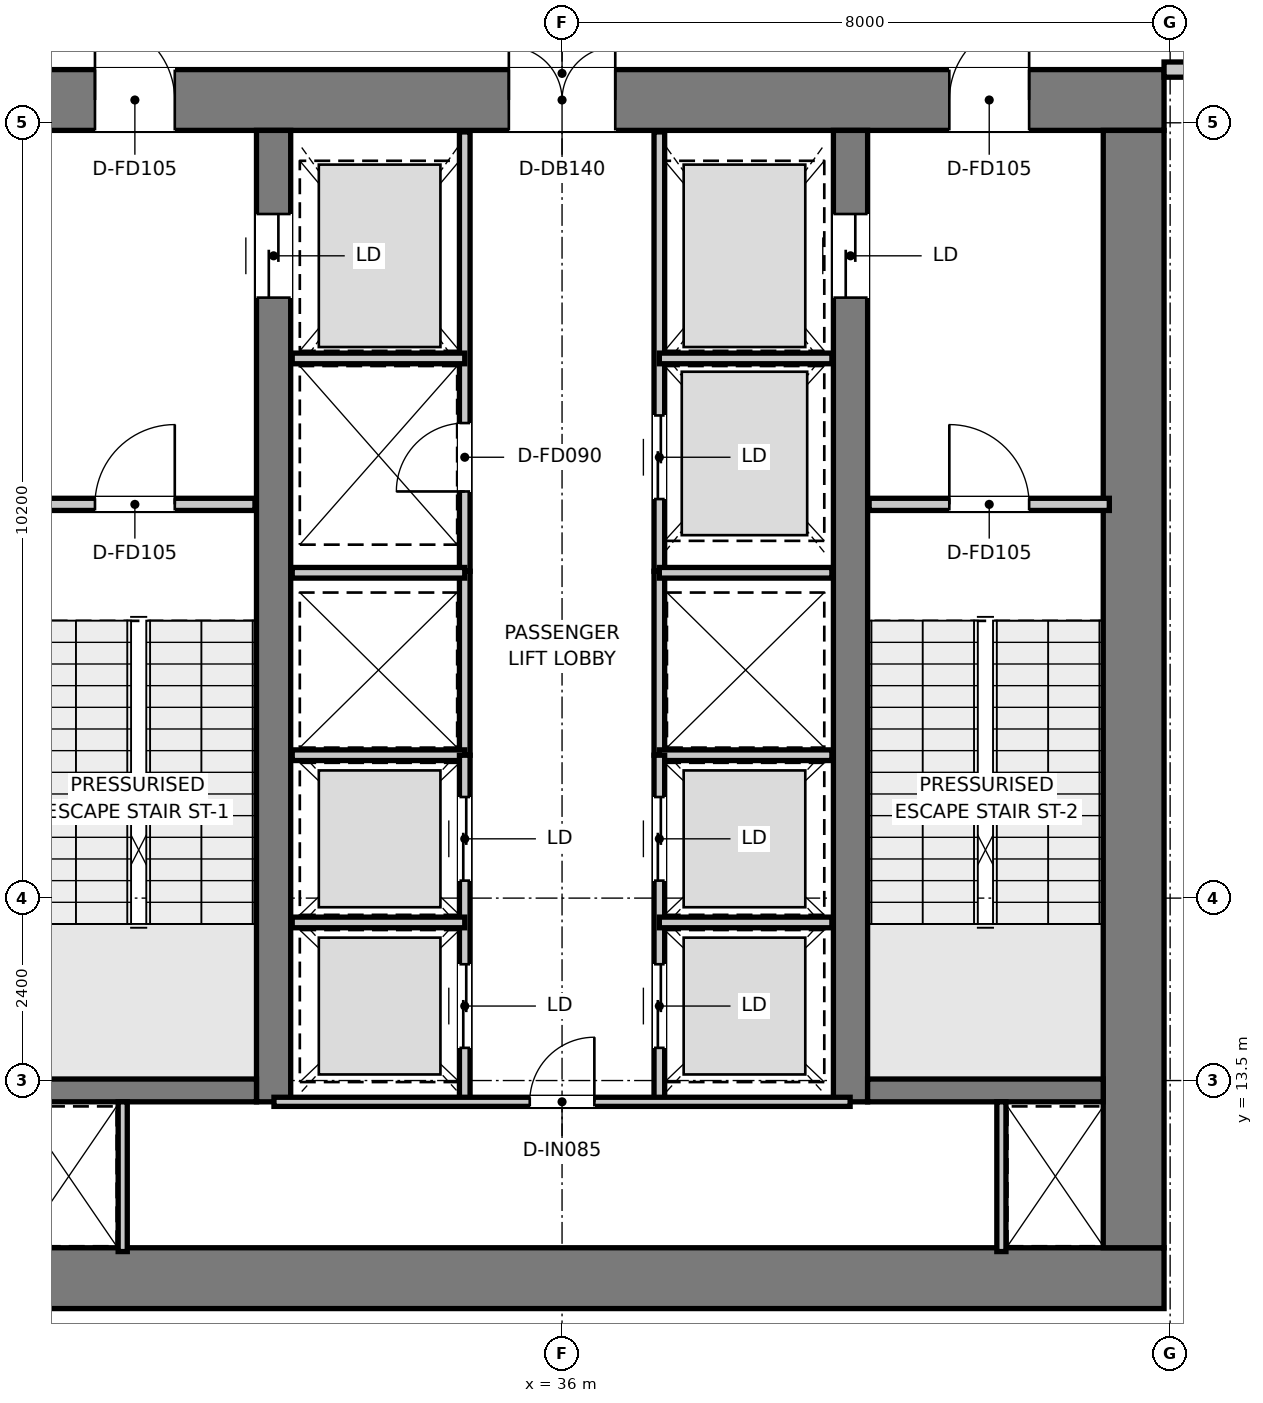
"""IFC4 building model, lengths in metres.
Left out: names, types, materials, properties, quantities, classifications, styles, units other than length and angle.
Written with IfcOpenShell. Run it as: python <this file> out.ifc"""

import sys

from ifc_helpers import new_model, si_unit, direction, frame, frame_2d, origin, place, context, subcontext, project, spatial, rectangle, extrude, element, fill, save


model = new_model("IFC4")
c1 = context("Model", 3, precision=1e-05, world=origin(), true_north=direction((0.0, 1.0)))
c2 = subcontext(c1, "Body", "Model", "MODEL_VIEW")
j1 = project(units=[si_unit("LENGTHUNIT", "METRE"), si_unit("PLANEANGLEUNIT", "RADIAN")], contexts=[c1])
p1 = place(None, origin())
s1 = spatial("IfcSite", under=j1, at=p1, CompositionType="ELEMENT")
p2 = place(p1, origin())
s2 = spatial("IfcBuilding", under=s1, at=p2, CompositionType="ELEMENT")
p3 = place(p2, frame((0.0, 0.0, 20.0)))
s3 = spatial("IfcBuildingStorey", under=s2, at=p3, CompositionType="ELEMENT", Elevation=20.0)
p4 = place(p3, frame((28.08, 10.9, 0.0), z_axis=(0.0, 0.0, 1.0), x_axis=(1.0, 0.0, 0.0)))
e1 = element("IfcWall", 1, at=p4, inside=s3, PredefinedType="SHEAR", context=c2, shape_type="SweptSolid", body=[
    extrude(rectangle(XDim=15.84, YDim=0.8, at=frame_2d((7.92, 0.0))), origin(), (0.0, 0.0, 1.0), 5.0),
])
p5 = place(p3, frame((28.08, 26.4, 0.0), z_axis=(0.0, 0.0, 1.0), x_axis=(1.0, 0.0, 0.0)))
e2 = element("IfcWall", 2, at=p5, inside=s3, PredefinedType="SHEAR", context=c2, shape_type="SweptSolid", body=[
    extrude(rectangle(XDim=15.84, YDim=0.8, at=frame_2d((7.92, 0.0))), origin(), (0.0, 0.0, 1.0), 5.0),
])
p6 = place(p5, frame((7.22, 0.0, 0.0)))
e3 = element("IfcOpeningElement", 3, at=p6, cuts=e2, PredefinedType="OPENING", context=c2, shape_type="SweptSolid", body=[
    extrude(rectangle(XDim=1.4, YDim=2.2, at=frame_2d((0.7, 1.1))), frame((0.0, 0.41, 0.0), z_axis=(0.0, -1.0, 0.0), x_axis=(1.0, 0.0, 0.0)), (0.0, 0.0, 1.0), 0.82),
])
p7 = place(p5, frame((1.775, 0.0, 0.0)))
e4 = element("IfcOpeningElement", 4, at=p7, cuts=e2, PredefinedType="OPENING", context=c2, shape_type="SweptSolid", body=[
    extrude(rectangle(XDim=1.05, YDim=2.1, at=frame_2d((0.525, 1.05))), frame((0.0, 0.41, 0.0), z_axis=(0.0, -1.0, 0.0), x_axis=(1.0, 0.0, 0.0)), (0.0, 0.0, 1.0), 0.82),
])
p8 = place(p5, frame((13.015, 0.0, 0.0)))
e5 = element("IfcOpeningElement", 5, at=p8, cuts=e2, PredefinedType="OPENING", context=c2, shape_type="SweptSolid", body=[
    extrude(rectangle(XDim=1.05, YDim=2.1, at=frame_2d((0.525, 1.05))), frame((0.0, 0.41, 0.0), z_axis=(0.0, -1.0, 0.0), x_axis=(1.0, 0.0, 0.0)), (0.0, 0.0, 1.0), 0.82),
])
p9 = place(p3, frame((43.52, 11.3, 0.0), z_axis=(0.0, 0.0, 1.0), x_axis=(0.0, 1.0, 0.0)))
e6 = element("IfcWall", 6, at=p9, inside=s3, PredefinedType="SHEAR", context=c2, shape_type="SweptSolid", body=[
    extrude(rectangle(XDim=14.7, YDim=0.8, at=frame_2d((7.35, 0.0))), origin(), (0.0, 0.0, 1.0), 5.0),
])
p10 = place(p3, frame((32.205, 13.22, 0.0), z_axis=(0.0, 0.0, 1.0), x_axis=(0.0, 1.0, 0.0)))
e7 = element("IfcWall", 7, at=p10, inside=s3, PredefinedType="SHEAR", context=c2, shape_type="SweptSolid", body=[
    extrude(rectangle(XDim=12.78, YDim=0.45, at=frame_2d((6.39, 0.0))), origin(), (0.0, 0.0, 1.0), 5.0),
])
p11 = place(p10, frame((10.58, 0.0, 0.0)))
e8 = element("IfcOpeningElement", 8, at=p11, cuts=e7, PredefinedType="OPENING", context=c2, shape_type="SweptSolid", body=[
    extrude(rectangle(XDim=1.1, YDim=2.15, at=frame_2d((0.55, 1.075))), frame((0.0, 0.235, 0.0), z_axis=(0.0, -1.0, 0.0), x_axis=(1.0, 0.0, 0.0)), (0.0, 0.0, 1.0), 0.47),
])
p12 = place(p3, frame((39.795, 13.22, 0.0), z_axis=(0.0, 0.0, 1.0), x_axis=(0.0, 1.0, 0.0)))
e9 = element("IfcWall", 9, at=p12, inside=s3, PredefinedType="SHEAR", context=c2, shape_type="SweptSolid", body=[
    extrude(rectangle(XDim=12.78, YDim=0.45, at=frame_2d((6.39, 0.0))), origin(), (0.0, 0.0, 1.0), 5.0),
])
p13 = place(p12, frame((10.58, 0.0, 0.0)))
e10 = element("IfcOpeningElement", 10, at=p13, cuts=e9, PredefinedType="OPENING", context=c2, shape_type="SweptSolid", body=[
    extrude(rectangle(XDim=1.1, YDim=2.15, at=frame_2d((0.55, 1.075))), frame((0.0, 0.235, 0.0), z_axis=(0.0, -1.0, 0.0), x_axis=(1.0, 0.0, 0.0)), (0.0, 0.0, 1.0), 0.47),
])
for number, where, z_axis, x_axis in (
    (11, (28.88, 13.37, 0.0), (0.0, 0.0, 1.0), (1.0, 0.0, 0.0)),
    (12, (40.02, 13.37, 0.0), (0.0, 0.0, 1.0), (1.0, 0.0, 0.0)),
):
    element("IfcWall", number, at=place(p3, frame(where, z_axis=z_axis, x_axis=x_axis)), inside=s3, PredefinedType="SHEAR", context=c2, shape_type="SweptSolid", body=[
        extrude(rectangle(XDim=3.1, YDim=0.3, at=frame_2d((1.55, 0.0))), origin(), (0.0, 0.0, 1.0), 5.0),
    ])
p14 = place(p3, frame((28.8, 21.08, 0.0), z_axis=(0.0, 0.0, 1.0), x_axis=(1.0, 0.0, 0.0)))
e13 = element("IfcWall", 13, at=p14, inside=s3, PredefinedType="PARTITIONING", context=c2, shape_type="SweptSolid", body=[
    extrude(rectangle(XDim=3.16, YDim=0.16, at=frame_2d((1.58, 0.0))), origin(), (0.0, 0.0, 1.0), 4.72),
])
p15 = place(p14, frame((1.055, 0.0, 0.0)))
e14 = element("IfcOpeningElement", 14, at=p15, cuts=e13, PredefinedType="OPENING", context=c2, shape_type="SweptSolid", body=[
    extrude(rectangle(XDim=1.05, YDim=2.1, at=frame_2d((0.525, 1.05))), frame((0.0, 0.09, 0.0), z_axis=(0.0, -1.0, 0.0), x_axis=(1.0, 0.0, 0.0)), (0.0, 0.0, 1.0), 0.18),
])
p16 = place(p3, frame((40.04, 21.08, 0.0), z_axis=(0.0, 0.0, 1.0), x_axis=(1.0, 0.0, 0.0)))
e15 = element("IfcWall", 15, at=p16, inside=s3, PredefinedType="PARTITIONING", context=c2, shape_type="SweptSolid", body=[
    extrude(rectangle(XDim=3.16, YDim=0.16, at=frame_2d((1.58, 0.0))), origin(), (0.0, 0.0, 1.0), 4.72),
])
p17 = place(p16, frame((1.055, 0.0, 0.0)))
e16 = element("IfcOpeningElement", 16, at=p17, cuts=e15, PredefinedType="OPENING", context=c2, shape_type="SweptSolid", body=[
    extrude(rectangle(XDim=1.05, YDim=2.1, at=frame_2d((0.525, 1.05))), frame((0.0, 0.09, 0.0), z_axis=(0.0, -1.0, 0.0), x_axis=(1.0, 0.0, 0.0)), (0.0, 0.0, 1.0), 0.18),
])
p18 = place(p3, frame((34.72, 20.2, 0.0), z_axis=(0.0, 0.0, 1.0), x_axis=(0.0, 1.0, 0.0)))
e17 = element("IfcWall", 17, at=p18, inside=s3, PredefinedType="PARTITIONING", context=c2, shape_type="SweptSolid", body=[
    extrude(rectangle(XDim=5.78, YDim=0.14, at=frame_2d((2.89, 0.0))), origin(), (0.0, 0.0, 1.0), 3.52),
])
p19 = place(p18, frame((1.05, 0.0, 0.0)))
e18 = element("IfcOpeningElement", 18, at=p19, cuts=e17, PredefinedType="OPENING", context=c2, shape_type="SweptSolid", body=[
    extrude(rectangle(XDim=0.9, YDim=2.1, at=frame_2d((0.45, 1.05))), frame((0.0, 0.08, 0.0), z_axis=(0.0, -1.0, 0.0), x_axis=(1.0, 0.0, 0.0)), (0.0, 0.0, 1.0), 0.16),
])
p20 = place(p3, frame((37.28, 20.2, 0.0), z_axis=(0.0, 0.0, 1.0), x_axis=(0.0, 1.0, 0.0)))
e19 = element("IfcWall", 19, at=p20, inside=s3, PredefinedType="PARTITIONING", context=c2, shape_type="SweptSolid", body=[
    extrude(rectangle(XDim=5.78, YDim=0.14, at=frame_2d((2.89, 0.0))), origin(), (0.0, 0.0, 1.0), 3.52),
])
p21 = place(p20, frame((0.95, 0.0, 0.0)))
e20 = element("IfcOpeningElement", 20, at=p21, cuts=e19, PredefinedType="OPENING", context=c2, shape_type="SweptSolid", body=[
    extrude(rectangle(XDim=1.1, YDim=2.15, at=frame_2d((0.55, 1.075))), frame((0.0, 0.08, 0.0), z_axis=(0.0, -1.0, 0.0), x_axis=(1.0, 0.0, 0.0)), (0.0, 0.0, 1.0), 0.16),
])
for number, where, z_axis, x_axis in (
    (21, (32.45, 23.0, 0.0), (0.0, 0.0, 1.0), (1.0, 0.0, 0.0)),
    (22, (37.28, 23.0, 0.0), (0.0, 0.0, 1.0), (1.0, 0.0, 0.0)),
):
    element("IfcWall", number, at=place(p3, frame(where, z_axis=z_axis, x_axis=x_axis)), inside=s3, PredefinedType="PARTITIONING", context=c2, shape_type="SweptSolid", body=[
        extrude(rectangle(XDim=2.27, YDim=0.14, at=frame_2d((1.135, 0.0))), origin(), (0.0, 0.0, 1.0), 3.52),
    ])
for number, where, z_axis, x_axis in (
    (23, (34.72, 17.78, 0.0), (0.0, 0.0, 1.0), (0.0, 1.0, 0.0)),
    (24, (37.28, 17.78, 0.0), (0.0, 0.0, 1.0), (0.0, 1.0, 0.0)),
):
    element("IfcWall", number, at=place(p3, frame(where, z_axis=z_axis, x_axis=x_axis)), inside=s3, PredefinedType="PARTITIONING", context=c2, shape_type="SweptSolid", body=[
        extrude(rectangle(XDim=2.42, YDim=0.14, at=frame_2d((1.21, 0.0))), origin(), (0.0, 0.0, 1.0), 4.72),
    ])
for number, where, z_axis, x_axis in (
    (25, (32.45, 17.78, 0.0), (0.0, 0.0, 1.0), (1.0, 0.0, 0.0)),
    (26, (32.45, 20.18, 0.0), (0.0, 0.0, 1.0), (1.0, 0.0, 0.0)),
    (27, (37.28, 17.78, 0.0), (0.0, 0.0, 1.0), (1.0, 0.0, 0.0)),
    (28, (37.28, 20.18, 0.0), (0.0, 0.0, 1.0), (1.0, 0.0, 0.0)),
):
    element("IfcWall", number, at=place(p3, frame(where, z_axis=z_axis, x_axis=x_axis)), inside=s3, PredefinedType="PARTITIONING", context=c2, shape_type="SweptSolid", body=[
        extrude(rectangle(XDim=2.27, YDim=0.14, at=frame_2d((1.135, 0.0))), origin(), (0.0, 0.0, 1.0), 4.72),
    ])
p22 = place(p3, frame((34.72, 13.22, 0.0), z_axis=(0.0, 0.0, 1.0), x_axis=(0.0, 1.0, 0.0)))
e29 = element("IfcWall", 29, at=p22, inside=s3, PredefinedType="PARTITIONING", context=c2, shape_type="SweptSolid", body=[
    extrude(rectangle(XDim=4.56, YDim=0.14, at=frame_2d((2.28, 0.0))), origin(), (0.0, 0.0, 1.0), 4.72),
])
p23 = place(p22, frame((0.71, 0.0, 0.0)))
e30 = element("IfcOpeningElement", 30, at=p23, cuts=e29, PredefinedType="OPENING", context=c2, shape_type="SweptSolid", body=[
    extrude(rectangle(XDim=1.1, YDim=2.15, at=frame_2d((0.55, 1.075))), frame((0.0, 0.08, 0.0), z_axis=(0.0, -1.0, 0.0), x_axis=(1.0, 0.0, 0.0)), (0.0, 0.0, 1.0), 0.16),
])
p24 = place(p22, frame((2.91, 0.0, 0.0)))
e31 = element("IfcOpeningElement", 31, at=p24, cuts=e29, PredefinedType="OPENING", context=c2, shape_type="SweptSolid", body=[
    extrude(rectangle(XDim=1.1, YDim=2.15, at=frame_2d((0.55, 1.075))), frame((0.0, 0.08, 0.0), z_axis=(0.0, -1.0, 0.0), x_axis=(1.0, 0.0, 0.0)), (0.0, 0.0, 1.0), 0.16),
])
p25 = place(p3, frame((32.45, 15.58, 0.0), z_axis=(0.0, 0.0, 1.0), x_axis=(1.0, 0.0, 0.0)))
e32 = element("IfcWall", 32, at=p25, inside=s3, PredefinedType="PARTITIONING", context=c2, shape_type="SweptSolid", body=[
    extrude(rectangle(XDim=2.27, YDim=0.14, at=frame_2d((1.135, 0.0))), origin(), (0.0, 0.0, 1.0), 4.72),
])
p26 = place(p3, frame((37.28, 13.22, 0.0), z_axis=(0.0, 0.0, 1.0), x_axis=(0.0, 1.0, 0.0)))
e33 = element("IfcWall", 33, at=p26, inside=s3, PredefinedType="PARTITIONING", context=c2, shape_type="SweptSolid", body=[
    extrude(rectangle(XDim=4.56, YDim=0.14, at=frame_2d((2.28, 0.0))), origin(), (0.0, 0.0, 1.0), 4.72),
])
p27 = place(p26, frame((0.71, 0.0, 0.0)))
e34 = element("IfcOpeningElement", 34, at=p27, cuts=e33, PredefinedType="OPENING", context=c2, shape_type="SweptSolid", body=[
    extrude(rectangle(XDim=1.1, YDim=2.15, at=frame_2d((0.55, 1.075))), frame((0.0, 0.08, 0.0), z_axis=(0.0, -1.0, 0.0), x_axis=(1.0, 0.0, 0.0)), (0.0, 0.0, 1.0), 0.16),
])
p28 = place(p26, frame((2.91, 0.0, 0.0)))
e35 = element("IfcOpeningElement", 35, at=p28, cuts=e33, PredefinedType="OPENING", context=c2, shape_type="SweptSolid", body=[
    extrude(rectangle(XDim=1.1, YDim=2.15, at=frame_2d((0.55, 1.075))), frame((0.0, 0.08, 0.0), z_axis=(0.0, -1.0, 0.0), x_axis=(1.0, 0.0, 0.0)), (0.0, 0.0, 1.0), 0.16),
])
p29 = place(p3, frame((37.28, 15.58, 0.0), z_axis=(0.0, 0.0, 1.0), x_axis=(1.0, 0.0, 0.0)))
e36 = element("IfcWall", 36, at=p29, inside=s3, PredefinedType="PARTITIONING", context=c2, shape_type="SweptSolid", body=[
    extrude(rectangle(XDim=2.27, YDim=0.14, at=frame_2d((1.135, 0.0))), origin(), (0.0, 0.0, 1.0), 4.72),
])
for number, where, z_axis, x_axis in (
    (37, (30.22, 11.25, 0.0), (0.0, 0.0, 1.0), (0.0, 1.0, 0.0)),
    (38, (41.78, 11.25, 0.0), (0.0, 0.0, 1.0), (0.0, 1.0, 0.0)),
):
    element("IfcWall", number, at=place(p3, frame(where, z_axis=z_axis, x_axis=x_axis)), inside=s3, PredefinedType="PARTITIONING", context=c2, shape_type="SweptSolid", body=[
        extrude(rectangle(XDim=1.97, YDim=0.12, at=frame_2d((0.985, 0.0))), origin(), (0.0, 0.0, 1.0), 4.72),
    ])
p30 = place(p3, frame((32.21, 13.22, 0.0), z_axis=(0.0, 0.0, 1.0), x_axis=(1.0, 0.0, 0.0)))
e39 = element("IfcWall", 39, at=p30, inside=s3, PredefinedType="PARTITIONING", context=c2, shape_type="SweptSolid", body=[
    extrude(rectangle(XDim=7.58, YDim=0.12, at=frame_2d((3.79, 0.0))), origin(), (0.0, 0.0, 1.0), 4.72),
])
p31 = place(p30, frame((3.365, 0.0, 0.0)))
e40 = element("IfcOpeningElement", 40, at=p31, cuts=e39, PredefinedType="OPENING", context=c2, shape_type="SweptSolid", body=[
    extrude(rectangle(XDim=0.85, YDim=2.1, at=frame_2d((0.425, 1.05))), frame((0.0, 0.07, 0.0), z_axis=(0.0, -1.0, 0.0), x_axis=(1.0, 0.0, 0.0)), (0.0, 0.0, 1.0), 0.14),
])
p32 = place(p3, frame((43.92, 26.8, 0.0), z_axis=(0.0, 0.0, 1.0), x_axis=(1.0, 0.0, 0.0)))
e41 = element("IfcWall", 41, at=p32, inside=s3, PredefinedType="PARTITIONING", context=c2, shape_type="SweptSolid", body=[
    extrude(rectangle(XDim=10.16, YDim=0.2, at=frame_2d((5.08, 0.0))), origin(), (0.0, 0.0, 1.0), 3.92),
])
p33 = place(p32, frame((4.98, 0.0, 0.0)))
e42 = element("IfcOpeningElement", 42, at=p33, cuts=e41, PredefinedType="OPENING", context=c2, shape_type="SweptSolid", body=[
    extrude(rectangle(XDim=1.2, YDim=2.15, at=frame_2d((0.6, 1.075))), frame((0.0, 0.11, 0.0), z_axis=(0.0, -1.0, 0.0), x_axis=(1.0, 0.0, 0.0)), (0.0, 0.0, 1.0), 0.22),
])
p34 = place(p15, origin())
e43 = element("IfcDoor", 43, at=p34, inside=s3, OperationType="SINGLE_SWING_RIGHT", PredefinedType="DOOR", context=c2, shape_type="SweptSolid", body=[
    extrude(rectangle(XDim=1.05, YDim=2.1, at=frame_2d((0.525, 1.05))), frame((0.0, 0.025, 0.0), z_axis=(0.0, -1.0, 0.0), x_axis=(1.0, 0.0, 0.0)), (0.0, 0.0, 1.0), 0.05),
])
fill(e14, e43)
p35 = place(p17, origin())
e44 = element("IfcDoor", 44, at=p35, inside=s3, OperationType="SINGLE_SWING_LEFT", PredefinedType="DOOR", context=c2, shape_type="SweptSolid", body=[
    extrude(rectangle(XDim=1.05, YDim=2.1, at=frame_2d((0.525, 1.05))), frame((0.0, 0.025, 0.0), z_axis=(0.0, -1.0, 0.0), x_axis=(1.0, 0.0, 0.0)), (0.0, 0.0, 1.0), 0.05),
])
fill(e16, e44)
p36 = place(p6, origin())
e45 = element("IfcDoor", 45, at=p36, inside=s3, OperationType="DOUBLE_DOOR_SINGLE_SWING", PredefinedType="DOOR", context=c2, shape_type="SweptSolid", body=[
    extrude(rectangle(XDim=1.4, YDim=2.2, at=frame_2d((0.7, 1.1))), frame((0.0, 0.025, 0.0), z_axis=(0.0, -1.0, 0.0), x_axis=(1.0, 0.0, 0.0)), (0.0, 0.0, 1.0), 0.05),
])
fill(e3, e45)
p37 = place(p7, origin())
e46 = element("IfcDoor", 46, at=p37, inside=s3, OperationType="SINGLE_SWING_LEFT", PredefinedType="DOOR", context=c2, shape_type="SweptSolid", body=[
    extrude(rectangle(XDim=1.05, YDim=2.1, at=frame_2d((0.525, 1.05))), frame((0.0, 0.025, 0.0), z_axis=(0.0, -1.0, 0.0), x_axis=(1.0, 0.0, 0.0)), (0.0, 0.0, 1.0), 0.05),
])
fill(e4, e46)
p38 = place(p8, origin())
e47 = element("IfcDoor", 47, at=p38, inside=s3, OperationType="SINGLE_SWING_RIGHT", PredefinedType="DOOR", context=c2, shape_type="SweptSolid", body=[
    extrude(rectangle(XDim=1.05, YDim=2.1, at=frame_2d((0.525, 1.05))), frame((0.0, 0.025, 0.0), z_axis=(0.0, -1.0, 0.0), x_axis=(1.0, 0.0, 0.0)), (0.0, 0.0, 1.0), 0.05),
])
fill(e5, e47)
p39 = place(p11, origin())
e48 = element("IfcDoor", 48, at=p39, inside=s3, OperationType="DOUBLE_DOOR_SLIDING", PredefinedType="DOOR", context=c2, shape_type="SweptSolid", body=[
    extrude(rectangle(XDim=1.1, YDim=2.15, at=frame_2d((0.55, 1.075))), frame((0.0, 0.025, 0.0), z_axis=(0.0, -1.0, 0.0), x_axis=(1.0, 0.0, 0.0)), (0.0, 0.0, 1.0), 0.05),
])
fill(e8, e48)
p40 = place(p13, origin())
e49 = element("IfcDoor", 49, at=p40, inside=s3, OperationType="DOUBLE_DOOR_SLIDING", PredefinedType="DOOR", context=c2, shape_type="SweptSolid", body=[
    extrude(rectangle(XDim=1.1, YDim=2.15, at=frame_2d((0.55, 1.075))), frame((0.0, 0.025, 0.0), z_axis=(0.0, -1.0, 0.0), x_axis=(1.0, 0.0, 0.0)), (0.0, 0.0, 1.0), 0.05),
])
fill(e10, e49)
p41 = place(p19, origin())
e50 = element("IfcDoor", 50, at=p41, inside=s3, OperationType="SINGLE_SWING_LEFT", PredefinedType="DOOR", context=c2, shape_type="SweptSolid", body=[
    extrude(rectangle(XDim=0.9, YDim=2.1, at=frame_2d((0.45, 1.05))), frame((0.0, 0.025, 0.0), z_axis=(0.0, -1.0, 0.0), x_axis=(1.0, 0.0, 0.0)), (0.0, 0.0, 1.0), 0.05),
])
fill(e18, e50)
p42 = place(p21, origin())
e51 = element("IfcDoor", 51, at=p42, inside=s3, OperationType="DOUBLE_DOOR_SLIDING", PredefinedType="DOOR", context=c2, shape_type="SweptSolid", body=[
    extrude(rectangle(XDim=1.1, YDim=2.15, at=frame_2d((0.55, 1.075))), frame((0.0, 0.025, 0.0), z_axis=(0.0, -1.0, 0.0), x_axis=(1.0, 0.0, 0.0)), (0.0, 0.0, 1.0), 0.05),
])
fill(e20, e51)
p43 = place(p23, origin())
e52 = element("IfcDoor", 52, at=p43, inside=s3, OperationType="DOUBLE_DOOR_SLIDING", PredefinedType="DOOR", context=c2, shape_type="SweptSolid", body=[
    extrude(rectangle(XDim=1.1, YDim=2.15, at=frame_2d((0.55, 1.075))), frame((0.0, 0.025, 0.0), z_axis=(0.0, -1.0, 0.0), x_axis=(1.0, 0.0, 0.0)), (0.0, 0.0, 1.0), 0.05),
])
fill(e30, e52)
p44 = place(p24, origin())
e53 = element("IfcDoor", 53, at=p44, inside=s3, OperationType="DOUBLE_DOOR_SLIDING", PredefinedType="DOOR", context=c2, shape_type="SweptSolid", body=[
    extrude(rectangle(XDim=1.1, YDim=2.15, at=frame_2d((0.55, 1.075))), frame((0.0, 0.025, 0.0), z_axis=(0.0, -1.0, 0.0), x_axis=(1.0, 0.0, 0.0)), (0.0, 0.0, 1.0), 0.05),
])
fill(e31, e53)
p45 = place(p27, origin())
e54 = element("IfcDoor", 54, at=p45, inside=s3, OperationType="DOUBLE_DOOR_SLIDING", PredefinedType="DOOR", context=c2, shape_type="SweptSolid", body=[
    extrude(rectangle(XDim=1.1, YDim=2.15, at=frame_2d((0.55, 1.075))), frame((0.0, 0.025, 0.0), z_axis=(0.0, -1.0, 0.0), x_axis=(1.0, 0.0, 0.0)), (0.0, 0.0, 1.0), 0.05),
])
fill(e34, e54)
p46 = place(p28, origin())
e55 = element("IfcDoor", 55, at=p46, inside=s3, OperationType="DOUBLE_DOOR_SLIDING", PredefinedType="DOOR", context=c2, shape_type="SweptSolid", body=[
    extrude(rectangle(XDim=1.1, YDim=2.15, at=frame_2d((0.55, 1.075))), frame((0.0, 0.025, 0.0), z_axis=(0.0, -1.0, 0.0), x_axis=(1.0, 0.0, 0.0)), (0.0, 0.0, 1.0), 0.05),
])
fill(e35, e55)
p47 = place(p31, origin())
e56 = element("IfcDoor", 56, at=p47, inside=s3, OperationType="SINGLE_SWING_RIGHT", PredefinedType="DOOR", context=c2, shape_type="SweptSolid", body=[
    extrude(rectangle(XDim=0.85, YDim=2.1, at=frame_2d((0.425, 1.05))), frame((0.0, 0.025, 0.0), z_axis=(0.0, -1.0, 0.0), x_axis=(1.0, 0.0, 0.0)), (0.0, 0.0, 1.0), 0.05),
])
fill(e40, e56)
save(model, sys.argv[1])
